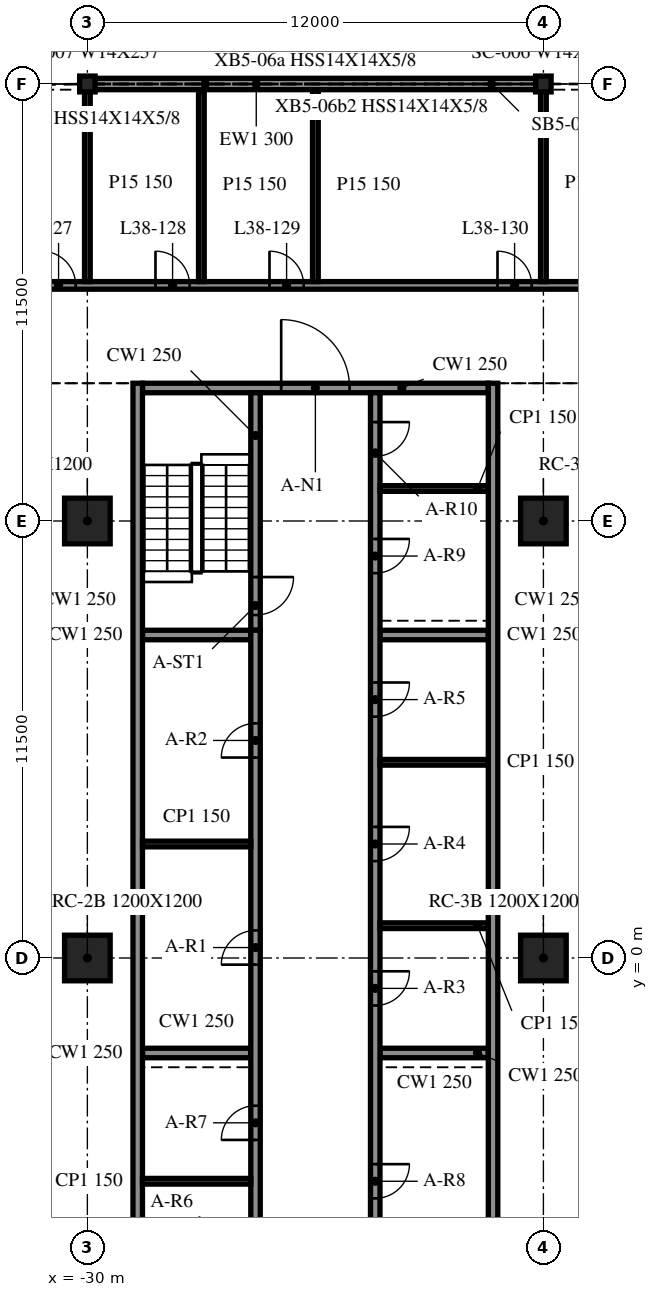
"""IFC4 building model, lengths in metres.
Left out: names, types, materials, properties, quantities, classifications, styles, units other than length and angle.
Written with IfcOpenShell. Run it as: python <this file> out.ifc"""

import sys

from ifc_helpers import new_model, si_unit, direction, frame, frame_2d, origin, origin_2d, place, context, subcontext, project, spatial, rectangle, i_section, extrude, element, fill, save


model = new_model("IFC4")
c1 = context("Model", 3, precision=1e-05, world=origin(), true_north=direction((0.0, 1.0)))
c2 = subcontext(c1, "Body", "Model", "MODEL_VIEW")
j1 = project(units=[si_unit("LENGTHUNIT", "METRE"), si_unit("PLANEANGLEUNIT", "RADIAN")], contexts=[c1])
p1 = place(None, origin())
s1 = spatial("IfcSite", under=j1, at=p1, CompositionType="ELEMENT")
p2 = place(p1, origin())
s2 = spatial("IfcBuilding", under=s1, at=p2, CompositionType="ELEMENT")
p3 = place(p2, frame((0.0, 0.0, 163.0)))
s3 = spatial("IfcBuildingStorey", under=s2, at=p3, CompositionType="ELEMENT", Elevation=163.0)
for number, where, z_axis, x_axis in (
    (1, (-30.0, 0.0, -0.34), (0.0, 0.0, 1.0), (1.0, 0.0, 0.0)),
    (2, (-30.0, 11.5, -0.34), (0.0, 0.0, 1.0), (1.0, 0.0, 0.0)),
    (3, (-18.0, 0.0, -0.34), (0.0, 0.0, 1.0), (1.0, 0.0, 0.0)),
    (4, (-18.0, 11.5, -0.34), (0.0, 0.0, 1.0), (1.0, 0.0, 0.0)),
):
    element("IfcColumn", number, at=place(p3, frame(where, z_axis=z_axis, x_axis=x_axis)), inside=s3, PredefinedType="COLUMN", context=c2, shape_type="SweptSolid", body=[
        extrude(rectangle(XDim=1.2, YDim=1.2, at=origin_2d()), origin(), (0.0, 0.0, 1.0), 3.8),
    ])
for number, where, z_axis, x_axis in (
    (5, (-18.0, 23.0, -0.34), (0.0, 0.0, 1.0), (1.0, 0.0, 0.0)),
    (6, (-30.0, 23.0, -0.34), (0.0, 0.0, 1.0), (1.0, 0.0, 0.0)),
):
    element("IfcColumn", number, at=place(p3, frame(where, z_axis=z_axis, x_axis=x_axis)), inside=s3, PredefinedType="COLUMN", context=c2, shape_type="SweptSolid", body=[
        extrude(i_section(OverallWidth=0.406, OverallDepth=0.417, WebThickness=0.03, FlangeThickness=0.048, at=origin_2d()), origin(), (0.0, 0.0, 1.0), 3.8),
    ])
p4 = place(p3, frame((-18.015, 23.0, 0.0), z_axis=(0.0, 0.0, 1.0), x_axis=(-1.0, 0.0, 0.0)))
e7 = element("IfcWall", 7, at=p4, inside=s3, PredefinedType="NOTDEFINED", context=c2, shape_type="SweptSolid", body=[
    extrude(rectangle(XDim=11.97, YDim=0.3, at=frame_2d((5.985, 0.0))), origin(), (0.0, 0.0, 1.0), 2.782),
])
for number, where, z_axis, x_axis in (
    (8, (-28.675, 15.125, 0.0), (0.0, 0.0, 1.0), (0.0, -1.0, 0.0)),
    (9, (-19.325, -9.125, 0.0), (0.0, 0.0, 1.0), (0.0, 1.0, 0.0)),
):
    element("IfcWall", number, at=place(p3, frame(where, z_axis=z_axis, x_axis=x_axis)), inside=s3, PredefinedType="SOLIDWALL", context=c2, shape_type="SweptSolid", body=[
        extrude(rectangle(XDim=24.25, YDim=0.25, at=frame_2d((12.125, 0.0))), origin(), (0.0, 0.0, 1.0), 3.46),
    ])
p5 = place(p3, frame((-28.55, 15.0, 0.0), z_axis=(0.0, 0.0, 1.0), x_axis=(1.0, 0.0, 0.0)))
e10 = element("IfcWall", 10, at=p5, inside=s3, PredefinedType="SOLIDWALL", context=c2, shape_type="SweptSolid", body=[
    extrude(rectangle(XDim=9.1, YDim=0.25, at=frame_2d((4.55, 0.0))), origin(), (0.0, 0.0, 1.0), 3.46),
])
p6 = place(p5, frame((3.65, 0.0, 0.0)))
e11 = element("IfcOpeningElement", 11, at=p6, cuts=e10, PredefinedType="OPENING", context=c2, shape_type="SweptSolid", body=[
    extrude(rectangle(XDim=1.8, YDim=2.1, at=frame_2d((0.9, 1.05))), frame((0.0, 0.135, 0.0), z_axis=(0.0, -1.0, 0.0), x_axis=(1.0, 0.0, 0.0)), (0.0, 0.0, 1.0), 0.27),
])
p7 = place(p3, frame((-25.575, -8.875, 0.0), z_axis=(0.0, 0.0, 1.0), x_axis=(0.0, 1.0, 0.0)))
e12 = element("IfcWall", 12, at=p7, inside=s3, PredefinedType="SOLIDWALL", context=c2, shape_type="SweptSolid", body=[
    extrude(rectangle(XDim=17.5, YDim=0.25, at=frame_2d((8.75, 0.0))), origin(), (0.0, 0.0, 1.0), 3.46),
])
p8 = place(p7, frame((8.7, 0.0, 0.0)))
e13 = element("IfcOpeningElement", 13, at=p8, cuts=e12, PredefinedType="OPENING", context=c2, shape_type="SweptSolid", body=[
    extrude(rectangle(XDim=0.9, YDim=2.1, at=frame_2d((0.45, 1.05))), frame((0.0, 0.135, 0.0), z_axis=(0.0, -1.0, 0.0), x_axis=(1.0, 0.0, 0.0)), (0.0, 0.0, 1.0), 0.27),
])
p9 = place(p7, frame((14.15, 0.0, 0.0)))
e14 = element("IfcOpeningElement", 14, at=p9, cuts=e12, PredefinedType="OPENING", context=c2, shape_type="SweptSolid", body=[
    extrude(rectangle(XDim=0.9, YDim=2.1, at=frame_2d((0.45, 1.05))), frame((0.0, 0.135, 0.0), z_axis=(0.0, -1.0, 0.0), x_axis=(1.0, 0.0, 0.0)), (0.0, 0.0, 1.0), 0.27),
])
p10 = place(p7, frame((1.012, 0.0, 0.0)))
e15 = element("IfcOpeningElement", 15, at=p10, cuts=e12, PredefinedType="OPENING", context=c2, shape_type="SweptSolid", body=[
    extrude(rectangle(XDim=0.9, YDim=2.1, at=frame_2d((0.45, 1.05))), frame((0.0, 0.135, 0.0), z_axis=(0.0, -1.0, 0.0), x_axis=(1.0, 0.0, 0.0)), (0.0, 0.0, 1.0), 0.27),
])
p11 = place(p7, frame((4.087, 0.0, 0.0)))
e16 = element("IfcOpeningElement", 16, at=p11, cuts=e12, PredefinedType="OPENING", context=c2, shape_type="SweptSolid", body=[
    extrude(rectangle(XDim=0.9, YDim=2.1, at=frame_2d((0.45, 1.05))), frame((0.0, 0.135, 0.0), z_axis=(0.0, -1.0, 0.0), x_axis=(1.0, 0.0, 0.0)), (0.0, 0.0, 1.0), 0.27),
])
p12 = place(p3, frame((-25.575, 14.875, 0.0), z_axis=(0.0, 0.0, 1.0), x_axis=(0.0, -1.0, 0.0)))
e17 = element("IfcWall", 17, at=p12, inside=s3, PredefinedType="SOLIDWALL", context=c2, shape_type="SweptSolid", body=[
    extrude(rectangle(XDim=6.25, YDim=0.25, at=frame_2d((3.125, 0.0))), origin(), (0.0, 0.0, 1.0), 3.46),
])
p13 = place(p12, frame((4.85, 0.0, 0.0)))
e18 = element("IfcOpeningElement", 18, at=p13, cuts=e17, PredefinedType="OPENING", context=c2, shape_type="SweptSolid", body=[
    extrude(rectangle(XDim=1.0, YDim=2.1, at=frame_2d((0.5, 1.05))), frame((0.0, 0.135, 0.0), z_axis=(0.0, -1.0, 0.0), x_axis=(1.0, 0.0, 0.0)), (0.0, 0.0, 1.0), 0.27),
])
p14 = place(p3, frame((-22.425, 14.875, 0.0), z_axis=(0.0, 0.0, 1.0), x_axis=(0.0, -1.0, 0.0)))
e19 = element("IfcWall", 19, at=p14, inside=s3, PredefinedType="SOLIDWALL", context=c2, shape_type="SweptSolid", body=[
    extrude(rectangle(XDim=23.75, YDim=0.25, at=frame_2d((11.875, 0.0))), origin(), (0.0, 0.0, 1.0), 3.46),
])
p15 = place(p14, frame((15.225, 0.0, 0.0)))
e20 = element("IfcOpeningElement", 20, at=p15, cuts=e19, PredefinedType="OPENING", context=c2, shape_type="SweptSolid", body=[
    extrude(rectangle(XDim=0.9, YDim=2.1, at=frame_2d((0.45, 1.05))), frame((0.0, 0.135, 0.0), z_axis=(0.0, -1.0, 0.0), x_axis=(1.0, 0.0, 0.0)), (0.0, 0.0, 1.0), 0.27),
])
p16 = place(p14, frame((11.425, 0.0, 0.0)))
e21 = element("IfcOpeningElement", 21, at=p16, cuts=e19, PredefinedType="OPENING", context=c2, shape_type="SweptSolid", body=[
    extrude(rectangle(XDim=0.9, YDim=2.1, at=frame_2d((0.45, 1.05))), frame((0.0, 0.135, 0.0), z_axis=(0.0, -1.0, 0.0), x_axis=(1.0, 0.0, 0.0)), (0.0, 0.0, 1.0), 0.27),
])
p17 = place(p14, frame((7.625, 0.0, 0.0)))
e22 = element("IfcOpeningElement", 22, at=p17, cuts=e19, PredefinedType="OPENING", context=c2, shape_type="SweptSolid", body=[
    extrude(rectangle(XDim=0.9, YDim=2.1, at=frame_2d((0.45, 1.05))), frame((0.0, 0.135, 0.0), z_axis=(0.0, -1.0, 0.0), x_axis=(1.0, 0.0, 0.0)), (0.0, 0.0, 1.0), 0.27),
])
p18 = place(p14, frame((20.3, 0.0, 0.0)))
e23 = element("IfcOpeningElement", 23, at=p18, cuts=e19, PredefinedType="OPENING", context=c2, shape_type="SweptSolid", body=[
    extrude(rectangle(XDim=0.9, YDim=2.1, at=frame_2d((0.45, 1.05))), frame((0.0, 0.135, 0.0), z_axis=(0.0, -1.0, 0.0), x_axis=(1.0, 0.0, 0.0)), (0.0, 0.0, 1.0), 0.27),
])
p19 = place(p14, frame((3.847, 0.0, 0.0)))
e24 = element("IfcOpeningElement", 24, at=p19, cuts=e19, PredefinedType="OPENING", context=c2, shape_type="SweptSolid", body=[
    extrude(rectangle(XDim=0.9, YDim=2.1, at=frame_2d((0.45, 1.05))), frame((0.0, 0.135, 0.0), z_axis=(0.0, -1.0, 0.0), x_axis=(1.0, 0.0, 0.0)), (0.0, 0.0, 1.0), 0.27),
])
p20 = place(p14, frame((0.772, 0.0, 0.0)))
e25 = element("IfcOpeningElement", 25, at=p20, cuts=e19, PredefinedType="OPENING", context=c2, shape_type="SweptSolid", body=[
    extrude(rectangle(XDim=0.9, YDim=2.1, at=frame_2d((0.45, 1.05))), frame((0.0, 0.135, 0.0), z_axis=(0.0, -1.0, 0.0), x_axis=(1.0, 0.0, 0.0)), (0.0, 0.0, 1.0), 0.27),
])
for number, where, z_axis, x_axis in (
    (26, (-28.55, -2.5, 0.0), (0.0, 0.0, 1.0), (1.0, 0.0, 0.0)),
    (27, (-28.55, 8.5, 0.0), (0.0, 0.0, 1.0), (1.0, 0.0, 0.0)),
    (28, (-22.3, -2.5, 0.0), (0.0, 0.0, 1.0), (1.0, 0.0, 0.0)),
    (29, (-22.3, 8.5, 0.0), (0.0, 0.0, 1.0), (1.0, 0.0, 0.0)),
):
    element("IfcWall", number, at=place(p3, frame(where, z_axis=z_axis, x_axis=x_axis)), inside=s3, PredefinedType="SOLIDWALL", context=c2, shape_type="SweptSolid", body=[
        extrude(rectangle(XDim=2.85, YDim=0.25, at=frame_2d((1.425, 0.0))), origin(), (0.0, 0.0, 1.0), 3.46),
    ])
for number, where, z_axis, x_axis in (
    (30, (-28.55, 3.0, 0.0), (0.0, 0.0, 1.0), (1.0, 0.0, 0.0)),
    (31, (-22.3, 0.85, 0.0), (0.0, 0.0, 1.0), (1.0, 0.0, 0.0)),
    (32, (-22.3, 5.15, 0.0), (0.0, 0.0, 1.0), (1.0, 0.0, 0.0)),
    (33, (-28.55, -5.875, 0.0), (0.0, 0.0, 1.0), (1.0, 0.0, 0.0)),
    (34, (-22.3, 12.355, 0.0), (0.0, 0.0, 1.0), (1.0, 0.0, 0.0)),
):
    element("IfcWall", number, at=place(p3, frame(where, z_axis=z_axis, x_axis=x_axis)), inside=s3, PredefinedType="PARTITIONING", context=c2, shape_type="SweptSolid", body=[
        extrude(rectangle(XDim=2.85, YDim=0.15, at=frame_2d((1.425, 0.0))), origin(), (0.0, 0.0, 1.0), 3.46),
    ])
p21 = place(p3, frame((-47.708, 17.7, 0.0), z_axis=(0.0, 0.0, 1.0), x_axis=(1.0, 0.0, 0.0)))
e35 = element("IfcWall", 35, at=p21, inside=s3, PredefinedType="PARTITIONING", context=c2, shape_type="SweptSolid", body=[
    extrude(rectangle(XDim=95.416, YDim=0.2, at=frame_2d((47.708, 0.0))), origin(), (0.0, 0.0, 1.0), 3.46),
])
p22 = place(p21, frame((4.5, 0.0, 0.0)))
e36 = element("IfcOpeningElement", 36, at=p22, cuts=e35, PredefinedType="OPENING", context=c2, shape_type="SweptSolid", body=[
    extrude(rectangle(XDim=0.9, YDim=2.1, at=frame_2d((0.45, 1.05))), frame((0.0, 0.11, 0.0), z_axis=(0.0, -1.0, 0.0), x_axis=(1.0, 0.0, 0.0)), (0.0, 0.0, 1.0), 0.22),
])
p23 = place(p21, frame((16.5, 0.0, 0.0)))
e37 = element("IfcOpeningElement", 37, at=p23, cuts=e35, PredefinedType="OPENING", context=c2, shape_type="SweptSolid", body=[
    extrude(rectangle(XDim=0.9, YDim=2.1, at=frame_2d((0.45, 1.05))), frame((0.0, 0.11, 0.0), z_axis=(0.0, -1.0, 0.0), x_axis=(1.0, 0.0, 0.0)), (0.0, 0.0, 1.0), 0.22),
])
p24 = place(p21, frame((19.5, 0.0, 0.0)))
e38 = element("IfcOpeningElement", 38, at=p24, cuts=e35, PredefinedType="OPENING", context=c2, shape_type="SweptSolid", body=[
    extrude(rectangle(XDim=0.9, YDim=2.1, at=frame_2d((0.45, 1.05))), frame((0.0, 0.11, 0.0), z_axis=(0.0, -1.0, 0.0), x_axis=(1.0, 0.0, 0.0)), (0.0, 0.0, 1.0), 0.22),
])
p25 = place(p21, frame((22.5, 0.0, 0.0)))
e39 = element("IfcOpeningElement", 39, at=p25, cuts=e35, PredefinedType="OPENING", context=c2, shape_type="SweptSolid", body=[
    extrude(rectangle(XDim=0.9, YDim=2.1, at=frame_2d((0.45, 1.05))), frame((0.0, 0.11, 0.0), z_axis=(0.0, -1.0, 0.0), x_axis=(1.0, 0.0, 0.0)), (0.0, 0.0, 1.0), 0.22),
])
p26 = place(p21, frame((28.5, 0.0, 0.0)))
e40 = element("IfcOpeningElement", 40, at=p26, cuts=e35, PredefinedType="OPENING", context=c2, shape_type="SweptSolid", body=[
    extrude(rectangle(XDim=0.9, YDim=2.1, at=frame_2d((0.45, 1.05))), frame((0.0, 0.11, 0.0), z_axis=(0.0, -1.0, 0.0), x_axis=(1.0, 0.0, 0.0)), (0.0, 0.0, 1.0), 0.22),
])
p27 = place(p21, frame((40.5, 0.0, 0.0)))
e41 = element("IfcOpeningElement", 41, at=p27, cuts=e35, PredefinedType="OPENING", context=c2, shape_type="SweptSolid", body=[
    extrude(rectangle(XDim=0.9, YDim=2.1, at=frame_2d((0.45, 1.05))), frame((0.0, 0.11, 0.0), z_axis=(0.0, -1.0, 0.0), x_axis=(1.0, 0.0, 0.0)), (0.0, 0.0, 1.0), 0.22),
])
p28 = place(p21, frame((43.5, 0.0, 0.0)))
e42 = element("IfcOpeningElement", 42, at=p28, cuts=e35, PredefinedType="OPENING", context=c2, shape_type="SweptSolid", body=[
    extrude(rectangle(XDim=0.9, YDim=2.1, at=frame_2d((0.45, 1.05))), frame((0.0, 0.11, 0.0), z_axis=(0.0, -1.0, 0.0), x_axis=(1.0, 0.0, 0.0)), (0.0, 0.0, 1.0), 0.22),
])
p29 = place(p21, frame((46.5, 0.0, 0.0)))
e43 = element("IfcOpeningElement", 43, at=p29, cuts=e35, PredefinedType="OPENING", context=c2, shape_type="SweptSolid", body=[
    extrude(rectangle(XDim=0.9, YDim=2.1, at=frame_2d((0.45, 1.05))), frame((0.0, 0.11, 0.0), z_axis=(0.0, -1.0, 0.0), x_axis=(1.0, 0.0, 0.0)), (0.0, 0.0, 1.0), 0.22),
])
p30 = place(p21, frame((48.1, 0.0, 0.0)))
e44 = element("IfcOpeningElement", 44, at=p30, cuts=e35, PredefinedType="OPENING", context=c2, shape_type="SweptSolid", body=[
    extrude(rectangle(XDim=0.9, YDim=2.1, at=frame_2d((0.45, 1.05))), frame((0.0, 0.11, 0.0), z_axis=(0.0, -1.0, 0.0), x_axis=(1.0, 0.0, 0.0)), (0.0, 0.0, 1.0), 0.22),
])
p31 = place(p21, frame((54.1, 0.0, 0.0)))
e45 = element("IfcOpeningElement", 45, at=p31, cuts=e35, PredefinedType="OPENING", context=c2, shape_type="SweptSolid", body=[
    extrude(rectangle(XDim=0.9, YDim=2.1, at=frame_2d((0.45, 1.05))), frame((0.0, 0.11, 0.0), z_axis=(0.0, -1.0, 0.0), x_axis=(1.0, 0.0, 0.0)), (0.0, 0.0, 1.0), 0.22),
])
p32 = place(p21, frame((66.1, 0.0, 0.0)))
e46 = element("IfcOpeningElement", 46, at=p32, cuts=e35, PredefinedType="OPENING", context=c2, shape_type="SweptSolid", body=[
    extrude(rectangle(XDim=0.9, YDim=2.1, at=frame_2d((0.45, 1.05))), frame((0.0, 0.11, 0.0), z_axis=(0.0, -1.0, 0.0), x_axis=(1.0, 0.0, 0.0)), (0.0, 0.0, 1.0), 0.22),
])
p33 = place(p21, frame((69.1, 0.0, 0.0)))
e47 = element("IfcOpeningElement", 47, at=p33, cuts=e35, PredefinedType="OPENING", context=c2, shape_type="SweptSolid", body=[
    extrude(rectangle(XDim=0.9, YDim=2.1, at=frame_2d((0.45, 1.05))), frame((0.0, 0.11, 0.0), z_axis=(0.0, -1.0, 0.0), x_axis=(1.0, 0.0, 0.0)), (0.0, 0.0, 1.0), 0.22),
])
p34 = place(p21, frame((72.1, 0.0, 0.0)))
e48 = element("IfcOpeningElement", 48, at=p34, cuts=e35, PredefinedType="OPENING", context=c2, shape_type="SweptSolid", body=[
    extrude(rectangle(XDim=0.9, YDim=2.1, at=frame_2d((0.45, 1.05))), frame((0.0, 0.11, 0.0), z_axis=(0.0, -1.0, 0.0), x_axis=(1.0, 0.0, 0.0)), (0.0, 0.0, 1.0), 0.22),
])
p35 = place(p21, frame((78.1, 0.0, 0.0)))
e49 = element("IfcOpeningElement", 49, at=p35, cuts=e35, PredefinedType="OPENING", context=c2, shape_type="SweptSolid", body=[
    extrude(rectangle(XDim=0.9, YDim=2.1, at=frame_2d((0.45, 1.05))), frame((0.0, 0.11, 0.0), z_axis=(0.0, -1.0, 0.0), x_axis=(1.0, 0.0, 0.0)), (0.0, 0.0, 1.0), 0.22),
])
p36 = place(p21, frame((90.1, 0.0, 0.0)))
e50 = element("IfcOpeningElement", 50, at=p36, cuts=e35, PredefinedType="OPENING", context=c2, shape_type="SweptSolid", body=[
    extrude(rectangle(XDim=0.9, YDim=2.1, at=frame_2d((0.45, 1.05))), frame((0.0, 0.11, 0.0), z_axis=(0.0, -1.0, 0.0), x_axis=(1.0, 0.0, 0.0)), (0.0, 0.0, 1.0), 0.22),
])
p37 = place(p3, frame((-30.0, 17.8, 0.0), z_axis=(0.0, 0.0, 1.0), x_axis=(0.0, 1.0, 0.0)))
e51 = element("IfcWall", 51, at=p37, inside=s3, PredefinedType="PARTITIONING", context=c2, shape_type="SweptSolid", body=[
    extrude(rectangle(XDim=5.175, YDim=0.15, at=frame_2d((2.587, 0.0))), origin(), (0.0, 0.0, 1.0), 3.46),
])
for number, where, z_axis, x_axis in (
    (52, (-27.0, 17.8, 0.0), (0.0, 0.0, 1.0), (0.0, 1.0, 0.0)),
    (53, (-24.0, 17.8, 0.0), (0.0, 0.0, 1.0), (0.0, 1.0, 0.0)),
):
    element("IfcWall", number, at=place(p3, frame(where, z_axis=z_axis, x_axis=x_axis)), inside=s3, PredefinedType="PARTITIONING", context=c2, shape_type="SweptSolid", body=[
        extrude(rectangle(XDim=5.05, YDim=0.15, at=frame_2d((2.525, 0.0))), origin(), (0.0, 0.0, 1.0), 3.46),
    ])
p38 = place(p3, frame((-18.0, 17.8, 0.0), z_axis=(0.0, 0.0, 1.0), x_axis=(0.0, 1.0, 0.0)))
e54 = element("IfcWall", 54, at=p38, inside=s3, PredefinedType="PARTITIONING", context=c2, shape_type="SweptSolid", body=[
    extrude(rectangle(XDim=5.175, YDim=0.15, at=frame_2d((2.587, 0.0))), origin(), (0.0, 0.0, 1.0), 3.46),
])
p39 = place(p6, origin())
e55 = element("IfcDoor", 55, at=p39, inside=s3, OperationType="DOUBLE_DOOR_SINGLE_SWING", PredefinedType="DOOR", context=c2, shape_type="SweptSolid", body=[
    extrude(rectangle(XDim=1.8, YDim=2.1, at=frame_2d((0.9, 1.05))), frame((0.0, 0.025, 0.0), z_axis=(0.0, -1.0, 0.0), x_axis=(1.0, 0.0, 0.0)), (0.0, 0.0, 1.0), 0.05),
])
fill(e11, e55)
p40 = place(p8, origin())
e56 = element("IfcDoor", 56, at=p40, inside=s3, OperationType="SINGLE_SWING_LEFT", PredefinedType="DOOR", context=c2, shape_type="SweptSolid", body=[
    extrude(rectangle(XDim=0.9, YDim=2.1, at=frame_2d((0.45, 1.05))), frame((0.0, 0.025, 0.0), z_axis=(0.0, -1.0, 0.0), x_axis=(1.0, 0.0, 0.0)), (0.0, 0.0, 1.0), 0.05),
])
fill(e13, e56)
p41 = place(p9, origin())
e57 = element("IfcDoor", 57, at=p41, inside=s3, OperationType="SINGLE_SWING_RIGHT", PredefinedType="DOOR", context=c2, shape_type="SweptSolid", body=[
    extrude(rectangle(XDim=0.9, YDim=2.1, at=frame_2d((0.45, 1.05))), frame((0.0, 0.025, 0.0), z_axis=(0.0, -1.0, 0.0), x_axis=(1.0, 0.0, 0.0)), (0.0, 0.0, 1.0), 0.05),
])
fill(e14, e57)
p42 = place(p15, origin())
e58 = element("IfcDoor", 58, at=p42, inside=s3, OperationType="SINGLE_SWING_LEFT", PredefinedType="DOOR", context=c2, shape_type="SweptSolid", body=[
    extrude(rectangle(XDim=0.9, YDim=2.1, at=frame_2d((0.45, 1.05))), frame((0.0, 0.025, 0.0), z_axis=(0.0, -1.0, 0.0), x_axis=(1.0, 0.0, 0.0)), (0.0, 0.0, 1.0), 0.05),
])
fill(e20, e58)
p43 = place(p16, origin())
e59 = element("IfcDoor", 59, at=p43, inside=s3, OperationType="SINGLE_SWING_RIGHT", PredefinedType="DOOR", context=c2, shape_type="SweptSolid", body=[
    extrude(rectangle(XDim=0.9, YDim=2.1, at=frame_2d((0.45, 1.05))), frame((0.0, 0.025, 0.0), z_axis=(0.0, -1.0, 0.0), x_axis=(1.0, 0.0, 0.0)), (0.0, 0.0, 1.0), 0.05),
])
fill(e21, e59)
p44 = place(p17, origin())
e60 = element("IfcDoor", 60, at=p44, inside=s3, OperationType="SINGLE_SWING_LEFT", PredefinedType="DOOR", context=c2, shape_type="SweptSolid", body=[
    extrude(rectangle(XDim=0.9, YDim=2.1, at=frame_2d((0.45, 1.05))), frame((0.0, 0.025, 0.0), z_axis=(0.0, -1.0, 0.0), x_axis=(1.0, 0.0, 0.0)), (0.0, 0.0, 1.0), 0.05),
])
fill(e22, e60)
p45 = place(p11, origin())
e61 = element("IfcDoor", 61, at=p45, inside=s3, OperationType="SINGLE_SWING_LEFT", PredefinedType="DOOR", context=c2, shape_type="SweptSolid", body=[
    extrude(rectangle(XDim=0.9, YDim=2.1, at=frame_2d((0.45, 1.05))), frame((0.0, 0.025, 0.0), z_axis=(0.0, -1.0, 0.0), x_axis=(1.0, 0.0, 0.0)), (0.0, 0.0, 1.0), 0.05),
])
fill(e16, e61)
p46 = place(p18, origin())
e62 = element("IfcDoor", 62, at=p46, inside=s3, OperationType="SINGLE_SWING_RIGHT", PredefinedType="DOOR", context=c2, shape_type="SweptSolid", body=[
    extrude(rectangle(XDim=0.9, YDim=2.1, at=frame_2d((0.45, 1.05))), frame((0.0, 0.025, 0.0), z_axis=(0.0, -1.0, 0.0), x_axis=(1.0, 0.0, 0.0)), (0.0, 0.0, 1.0), 0.05),
])
fill(e23, e62)
p47 = place(p19, origin())
e63 = element("IfcDoor", 63, at=p47, inside=s3, OperationType="SINGLE_SWING_LEFT", PredefinedType="DOOR", context=c2, shape_type="SweptSolid", body=[
    extrude(rectangle(XDim=0.9, YDim=2.1, at=frame_2d((0.45, 1.05))), frame((0.0, 0.025, 0.0), z_axis=(0.0, -1.0, 0.0), x_axis=(1.0, 0.0, 0.0)), (0.0, 0.0, 1.0), 0.05),
])
fill(e24, e63)
p48 = place(p20, origin())
e64 = element("IfcDoor", 64, at=p48, inside=s3, OperationType="SINGLE_SWING_RIGHT", PredefinedType="DOOR", context=c2, shape_type="SweptSolid", body=[
    extrude(rectangle(XDim=0.9, YDim=2.1, at=frame_2d((0.45, 1.05))), frame((0.0, 0.025, 0.0), z_axis=(0.0, -1.0, 0.0), x_axis=(1.0, 0.0, 0.0)), (0.0, 0.0, 1.0), 0.05),
])
fill(e25, e64)
p49 = place(p13, origin())
e65 = element("IfcDoor", 65, at=p49, inside=s3, OperationType="SINGLE_SWING_LEFT", PredefinedType="DOOR", context=c2, shape_type="SweptSolid", body=[
    extrude(rectangle(XDim=1.0, YDim=2.1, at=frame_2d((0.5, 1.05))), frame((0.0, 0.025, 0.0), z_axis=(0.0, -1.0, 0.0), x_axis=(1.0, 0.0, 0.0)), (0.0, 0.0, 1.0), 0.05),
])
fill(e18, e65)
p50 = place(p23, origin())
e66 = element("IfcDoor", 66, at=p50, inside=s3, OperationType="SINGLE_SWING_LEFT", PredefinedType="DOOR", context=c2, shape_type="SweptSolid", body=[
    extrude(rectangle(XDim=0.9, YDim=2.1, at=frame_2d((0.45, 1.05))), frame((0.0, 0.025, 0.0), z_axis=(0.0, -1.0, 0.0), x_axis=(1.0, 0.0, 0.0)), (0.0, 0.0, 1.0), 0.05),
])
fill(e37, e66)
p51 = place(p24, origin())
e67 = element("IfcDoor", 67, at=p51, inside=s3, OperationType="SINGLE_SWING_LEFT", PredefinedType="DOOR", context=c2, shape_type="SweptSolid", body=[
    extrude(rectangle(XDim=0.9, YDim=2.1, at=frame_2d((0.45, 1.05))), frame((0.0, 0.025, 0.0), z_axis=(0.0, -1.0, 0.0), x_axis=(1.0, 0.0, 0.0)), (0.0, 0.0, 1.0), 0.05),
])
fill(e38, e67)
p52 = place(p25, origin())
e68 = element("IfcDoor", 68, at=p52, inside=s3, OperationType="SINGLE_SWING_LEFT", PredefinedType="DOOR", context=c2, shape_type="SweptSolid", body=[
    extrude(rectangle(XDim=0.9, YDim=2.1, at=frame_2d((0.45, 1.05))), frame((0.0, 0.025, 0.0), z_axis=(0.0, -1.0, 0.0), x_axis=(1.0, 0.0, 0.0)), (0.0, 0.0, 1.0), 0.05),
])
fill(e39, e68)
p53 = place(p26, origin())
e69 = element("IfcDoor", 69, at=p53, inside=s3, OperationType="SINGLE_SWING_LEFT", PredefinedType="DOOR", context=c2, shape_type="SweptSolid", body=[
    extrude(rectangle(XDim=0.9, YDim=2.1, at=frame_2d((0.45, 1.05))), frame((0.0, 0.025, 0.0), z_axis=(0.0, -1.0, 0.0), x_axis=(1.0, 0.0, 0.0)), (0.0, 0.0, 1.0), 0.05),
])
fill(e40, e69)
save(model, sys.argv[1])
